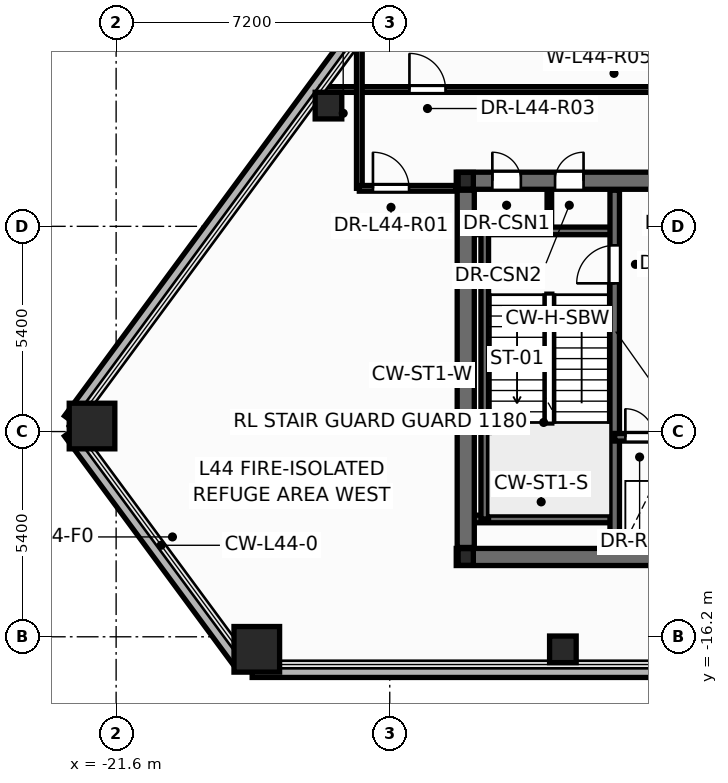
"""IFC4 building model, lengths in metres.
Left out: names, types, materials, properties, quantities, classifications, styles, units other than length and angle.
Written with IfcOpenShell. Run it as: python <this file> out.ifc"""

import sys

from ifc_helpers import new_model, si_unit, direction, frame, frame_2d, origin, origin_2d, place, context, subcontext, project, spatial, rectangle, hollow_rectangle, hollow_circle, i_section, extrude, element, fill, save


model = new_model("IFC4")
c1 = context("Model", 3, precision=1e-05, world=origin(), true_north=direction((0.0, 1.0)))
c2 = subcontext(c1, "Body", "Model", "MODEL_VIEW")
j1 = project(units=[si_unit("LENGTHUNIT", "METRE"), si_unit("PLANEANGLEUNIT", "RADIAN")], contexts=[c1])
p1 = place(None, origin())
s1 = spatial("IfcSite", under=j1, at=p1, CompositionType="ELEMENT")
p2 = place(p1, origin())
s2 = spatial("IfcBuilding", under=s1, at=p2, CompositionType="ELEMENT")
p3 = place(p2, frame((0.0, 0.0, 168.9)))
s3 = spatial("IfcBuildingStorey", under=s2, at=p3, CompositionType="ELEMENT", Elevation=168.9)
for number, where, z_axis, x_axis in (
    (1, (-22.234, -10.655, 0.0), (0.0, 0.0, 1.0), (1.0, 0.0, 0.0)),
    (2, (-17.898, -16.53, 0.0), (0.0, 0.0, 1.0), (1.0, 0.0, 0.0)),
):
    element("IfcColumn", number, at=place(p3, frame(where, z_axis=z_axis, x_axis=x_axis)), inside=s3, PredefinedType="COLUMN", context=c2, shape_type="SweptSolid", body=[
        extrude(hollow_rectangle(XDim=1.2, YDim=1.2, WallThickness=0.055, at=origin_2d()), origin(), (0.0, 0.0, 1.0), 4.8),
    ])
for number, where, z_axis, x_axis in (
    (3, (-9.844, -16.53, 0.0), (0.0, 0.0, 1.0), (1.0, 0.0, 0.0)),
    (4, (-16.012, -2.223, 0.0), (0.0, 0.0, 1.0), (1.0, 0.0, 0.0)),
):
    element("IfcColumn", number, at=place(p3, frame(where, z_axis=z_axis, x_axis=x_axis)), inside=s3, PredefinedType="COLUMN", context=c2, shape_type="SweptSolid", body=[
        extrude(hollow_circle(Radius=0.35, WallThickness=0.03, at=origin_2d()), origin(), (0.0, 0.0, 1.0), 4.8),
    ])
for number, where, z_axis, x_axis in (
    (5, (-12.4, -14.1, 0.0), (0.0, 0.0, 1.0), (1.0, 0.0, 0.0)),
    (6, (-12.4, -4.2, 0.0), (0.0, 0.0, 1.0), (1.0, 0.0, 0.0)),
):
    element("IfcColumn", number, at=place(p3, frame(where, z_axis=z_axis, x_axis=x_axis)), inside=s3, PredefinedType="COLUMN", context=c2, shape_type="SweptSolid", body=[
        extrude(i_section(OverallWidth=0.4, OverallDepth=0.44, WebThickness=0.028, FlangeThickness=0.04, at=origin_2d()), origin(), (0.0, 0.0, 1.0), 4.8),
    ])
p4 = place(p3, frame((-22.812, -10.814, -0.2), z_axis=(0.0, 0.0, 1.0), x_axis=(0.593789738392, -0.804620249919, 0.0)))
e7 = element("IfcWall", 7, at=p4, inside=s3, PredefinedType="PARAPET", context=c2, shape_type="SweptSolid", body=[
    extrude(rectangle(XDim=7.639, YDim=0.36, at=frame_2d((3.82, 0.0))), origin(), (0.0, 0.0, 1.0), 0.38),
])
p5 = place(p3, frame((-18.02, -17.09, -0.2), z_axis=(0.0, 0.0, 1.0), x_axis=(1.0, 0.0, 0.0)))
e8 = element("IfcWall", 8, at=p5, inside=s3, PredefinedType="PARAPET", context=c2, shape_type="SweptSolid", body=[
    extrude(rectangle(XDim=36.041, YDim=0.36, at=frame_2d((18.02, 0.0))), origin(), (0.0, 0.0, 1.0), 0.38),
])
p6 = place(p3, frame((-4.835, 13.865, -0.2), z_axis=(0.0, 0.0, 1.0), x_axis=(-0.593788907914, -0.804620862791, 0.0)))
e9 = element("IfcWall", 9, at=p6, inside=s3, PredefinedType="PARAPET", context=c2, shape_type="SweptSolid", body=[
    extrude(rectangle(XDim=30.276, YDim=0.36, at=frame_2d((15.138, 0.0))), origin(), (0.0, 0.0, 1.0), 0.38),
])
p7 = place(p3, frame((-10.2, -5.52, 0.0), z_axis=(0.0, 0.0, 1.0), x_axis=(0.0, 1.0, 0.0)))
e10 = element("IfcWall", 10, at=p7, inside=s3, PredefinedType="PARTITIONING", context=c2, shape_type="SweptSolid", body=[
    extrude(rectangle(XDim=1.12, YDim=0.12, at=frame_2d((0.56, 0.0))), origin(), (0.0, 0.0, 1.0), 4.52),
])
p8 = place(p3, frame((-12.65, -14.1, 0.0), z_axis=(0.0, 0.0, 1.0), x_axis=(1.0, 0.0, 0.0)))
e11 = element("IfcWall", 11, at=p8, inside=s3, PredefinedType="SHEAR", context=c2, shape_type="SweptSolid", body=[
    extrude(rectangle(XDim=25.3, YDim=0.45, at=frame_2d((12.65, 0.0))), origin(), (0.0, 0.0, 1.0), 4.8),
])
p9 = place(p3, frame((-12.65, -4.2, 0.0), z_axis=(0.0, 0.0, 1.0), x_axis=(1.0, 0.0, 0.0)))
e12 = element("IfcWall", 12, at=p9, inside=s3, PredefinedType="SHEAR", context=c2, shape_type="SweptSolid", body=[
    extrude(rectangle(XDim=25.3, YDim=0.45, at=frame_2d((12.65, 0.0))), origin(), (0.0, 0.0, 1.0), 4.8),
])
p10 = place(p9, frame((0.95, 0.0, 0.0)))
e13 = element("IfcOpeningElement", 13, at=p10, cuts=e12, PredefinedType="OPENING", context=c2, shape_type="SweptSolid", body=[
    extrude(rectangle(XDim=0.756, YDim=2.054, at=frame_2d((0.375, 1.027))), frame((0.0, 0.235, 0.0), z_axis=(0.0, -1.0, 0.0), x_axis=(1.0, 0.0, 0.0)), (0.0, 0.0, 1.0), 0.47),
])
p11 = place(p9, frame((2.6, 0.0, 0.0)))
e14 = element("IfcOpeningElement", 14, at=p11, cuts=e12, PredefinedType="OPENING", context=c2, shape_type="SweptSolid", body=[
    extrude(rectangle(XDim=0.756, YDim=2.054, at=frame_2d((0.375, 1.027))), frame((0.0, 0.235, 0.0), z_axis=(0.0, -1.0, 0.0), x_axis=(1.0, 0.0, 0.0)), (0.0, 0.0, 1.0), 0.47),
])
p12 = place(p9, frame((21.85, 0.0, 0.0)))
e15 = element("IfcOpeningElement", 15, at=p12, cuts=e12, PredefinedType="OPENING", context=c2, shape_type="SweptSolid", body=[
    extrude(rectangle(XDim=0.756, YDim=2.054, at=frame_2d((0.375, 1.027))), frame((0.0, 0.235, 0.0), z_axis=(0.0, -1.0, 0.0), x_axis=(1.0, 0.0, 0.0)), (0.0, 0.0, 1.0), 0.47),
])
p13 = place(p9, frame((23.5, 0.0, 0.0)))
e16 = element("IfcOpeningElement", 16, at=p13, cuts=e12, PredefinedType="OPENING", context=c2, shape_type="SweptSolid", body=[
    extrude(rectangle(XDim=0.756, YDim=2.054, at=frame_2d((0.375, 1.027))), frame((0.0, 0.235, 0.0), z_axis=(0.0, -1.0, 0.0), x_axis=(1.0, 0.0, 0.0)), (0.0, 0.0, 1.0), 0.47),
])
p14 = place(p9, frame((5.85, 0.0, 0.0)))
e17 = element("IfcOpeningElement", 17, at=p14, cuts=e12, PredefinedType="OPENING", context=c2, shape_type="SweptSolid", body=[
    extrude(rectangle(XDim=1.006, YDim=2.104, at=frame_2d((0.5, 1.052))), frame((0.0, 0.235, 0.0), z_axis=(0.0, -1.0, 0.0), x_axis=(1.0, 0.0, 0.0)), (0.0, 0.0, 1.0), 0.47),
])
p15 = place(p9, frame((10.35, 0.0, 0.0)))
e18 = element("IfcOpeningElement", 18, at=p15, cuts=e12, PredefinedType="OPENING", context=c2, shape_type="SweptSolid", body=[
    extrude(rectangle(XDim=1.406, YDim=2.154, at=frame_2d((0.7, 1.077))), frame((0.0, 0.235, 0.0), z_axis=(0.0, -1.0, 0.0), x_axis=(1.0, 0.0, 0.0)), (0.0, 0.0, 1.0), 0.47),
])
p16 = place(p9, frame((18.45, 0.0, 0.0)))
e19 = element("IfcOpeningElement", 19, at=p16, cuts=e12, PredefinedType="OPENING", context=c2, shape_type="SweptSolid", body=[
    extrude(rectangle(XDim=1.006, YDim=2.104, at=frame_2d((0.5, 1.052))), frame((0.0, 0.235, 0.0), z_axis=(0.0, -1.0, 0.0), x_axis=(1.0, 0.0, 0.0)), (0.0, 0.0, 1.0), 0.47),
])
for number, where, z_axis, x_axis in (
    (20, (-12.35, -5.52, 0.0), (0.0, 0.0, 1.0), (1.0, 0.0, 0.0)),
    (21, (-12.35, -13.1, 0.0), (0.0, 0.0, 1.0), (1.0, 0.0, 0.0)),
):
    element("IfcWall", number, at=place(p3, frame(where, z_axis=z_axis, x_axis=x_axis)), inside=s3, PredefinedType="SOLIDWALL", context=c2, shape_type="SweptSolid", body=[
        extrude(rectangle(XDim=3.87, YDim=0.2, at=frame_2d((1.935, 0.0))), origin(), (0.0, 0.0, 1.0), 4.8),
    ])
p17 = place(p3, frame((-11.9, -13.1, 0.0), z_axis=(0.0, 0.0, 1.0), x_axis=(0.0, 1.0, 0.0)))
e22 = element("IfcWall", 22, at=p17, inside=s3, PredefinedType="SOLIDWALL", context=c2, shape_type="SweptSolid", body=[
    extrude(rectangle(XDim=7.58, YDim=0.2, at=frame_2d((3.79, 0.0))), origin(), (0.0, 0.0, 1.0), 4.8),
])
p18 = place(p3, frame((-8.48, -13.85, 0.0), z_axis=(0.0, 0.0, 1.0), x_axis=(0.0, 1.0, 0.0)))
e23 = element("IfcWall", 23, at=p18, inside=s3, PredefinedType="SHEAR", context=c2, shape_type="SweptSolid", body=[
    extrude(rectangle(XDim=9.4, YDim=0.25, at=frame_2d((4.7, 0.0))), origin(), (0.0, 0.0, 1.0), 4.8),
])
p19 = place(p18, frame((6.95, 0.0, 0.0)))
e24 = element("IfcOpeningElement", 24, at=p19, cuts=e23, PredefinedType="OPENING", context=c2, shape_type="SweptSolid", body=[
    extrude(rectangle(XDim=1.006, YDim=2.104, at=frame_2d((0.5, 1.052))), frame((0.0, 0.135, 0.0), z_axis=(0.0, -1.0, 0.0), x_axis=(1.0, 0.0, 0.0)), (0.0, 0.0, 1.0), 0.27),
])
p20 = place(p3, frame((-8.48, -10.95, 0.0), z_axis=(0.0, 0.0, 1.0), x_axis=(1.0, 0.0, 0.0)))
e25 = element("IfcWall", 25, at=p20, inside=s3, PredefinedType="SOLIDWALL", context=c2, shape_type="SweptSolid", body=[
    extrude(rectangle(XDim=3.36, YDim=0.2, at=frame_2d((1.68, 0.0))), origin(), (0.0, 0.0, 1.0), 4.8),
])
p21 = place(p20, frame((0.28, 0.0, 0.0)))
e26 = element("IfcOpeningElement", 26, at=p21, cuts=e25, PredefinedType="OPENING", context=c2, shape_type="SweptSolid", body=[
    extrude(rectangle(XDim=0.756, YDim=2.054, at=frame_2d((0.375, 1.027))), frame((0.0, 0.11, 0.0), z_axis=(0.0, -1.0, 0.0), x_axis=(1.0, 0.0, 0.0)), (0.0, 0.0, 1.0), 0.22),
])
p22 = place(p20, frame((1.85, 0.0, 0.0)))
e27 = element("IfcOpeningElement", 27, at=p22, cuts=e25, PredefinedType="OPENING", context=c2, shape_type="SweptSolid", body=[
    extrude(rectangle(XDim=1.106, YDim=2.104, at=frame_2d((0.55, 1.052))), frame((0.0, 0.11, 0.0), z_axis=(0.0, -1.0, 0.0), x_axis=(1.0, 0.0, 0.0)), (0.0, 0.0, 1.0), 0.22),
])
p23 = place(p3, frame((-12.4, -13.85, 0.0), z_axis=(0.0, 0.0, 1.0), x_axis=(0.0, 1.0, 0.0)))
e28 = element("IfcWall", 28, at=p23, inside=s3, PredefinedType="SHEAR", context=c2, shape_type="SweptSolid", body=[
    extrude(rectangle(XDim=9.4, YDim=0.45, at=frame_2d((4.7, 0.0))), origin(), (0.0, 0.0, 1.0), 4.8),
])
p24 = place(p3, frame((-16.197, -1.8, 0.0), z_axis=(0.0, 0.0, 1.0), x_axis=(1.0, 0.0, 0.0)))
e29 = element("IfcWall", 29, at=p24, inside=s3, PredefinedType="PARTITIONING", context=c2, shape_type="SweptSolid", body=[
    extrude(rectangle(XDim=9.057, YDim=0.15, at=frame_2d((4.529, 0.0))), origin(), (0.0, 0.0, 1.0), 2.485),
])
p25 = place(p24, frame((2.315, 0.0, 0.0)))
e30 = element("IfcOpeningElement", 30, at=p25, cuts=e29, PredefinedType="OPENING", context=c2, shape_type="SweptSolid", body=[
    extrude(rectangle(XDim=0.956, YDim=2.104, at=frame_2d((0.475, 1.052))), frame((0.0, 0.085, 0.0), z_axis=(0.0, -1.0, 0.0), x_axis=(1.0, 0.0, 0.0)), (0.0, 0.0, 1.0), 0.17),
])
p26 = place(p3, frame((-15.2, -4.4, 0.0), z_axis=(0.0, 0.0, 1.0), x_axis=(0.0, 1.0, 0.0)))
e31 = element("IfcWall", 31, at=p26, inside=s3, PredefinedType="PARTITIONING", context=c2, shape_type="SweptSolid", body=[
    extrude(rectangle(XDim=3.951, YDim=0.15, at=frame_2d((1.975, 0.0))), origin(), (0.0, 0.0, 1.0), 2.485),
])
p27 = place(p3, frame((-15.2, -4.4, 0.0), z_axis=(0.0, 0.0, 1.0), x_axis=(1.0, 0.0, 0.0)))
e32 = element("IfcWall", 32, at=p27, inside=s3, PredefinedType="PARTITIONING", context=c2, shape_type="SweptSolid", body=[
    extrude(rectangle(XDim=2.548, YDim=0.15, at=frame_2d((1.274, 0.0))), origin(), (0.0, 0.0, 1.0), 2.485),
])
p28 = place(p27, frame((0.358, 0.0, 0.0)))
e33 = element("IfcOpeningElement", 33, at=p28, cuts=e32, PredefinedType="OPENING", context=c2, shape_type="SweptSolid", body=[
    extrude(rectangle(XDim=0.956, YDim=2.104, at=frame_2d((0.475, 1.052))), frame((0.0, 0.085, 0.0), z_axis=(0.0, -1.0, 0.0), x_axis=(1.0, 0.0, 0.0)), (0.0, 0.0, 1.0), 0.17),
])
p29 = place(p19, origin())
e34 = element("IfcDoor", 34, at=p29, inside=s3, OperationType="SINGLE_SWING_LEFT", PredefinedType="DOOR", context=c2, shape_type="SweptSolid", body=[
    extrude(rectangle(XDim=1.0, YDim=2.1, at=frame_2d((0.5, 1.05))), frame((0.0, 0.025, 0.0), z_axis=(0.0, -1.0, 0.0), x_axis=(1.0, 0.0, 0.0)), (0.0, 0.0, 1.0), 0.05),
])
fill(e24, e34)
p30 = place(p21, origin())
e35 = element("IfcDoor", 35, at=p30, inside=s3, OperationType="SINGLE_SWING_LEFT", PredefinedType="DOOR", context=c2, shape_type="SweptSolid", body=[
    extrude(rectangle(XDim=0.75, YDim=2.05, at=frame_2d((0.375, 1.025))), frame((0.0, 0.025, 0.0), z_axis=(0.0, -1.0, 0.0), x_axis=(1.0, 0.0, 0.0)), (0.0, 0.0, 1.0), 0.05),
])
fill(e26, e35)
p31 = place(p10, origin())
e36 = element("IfcDoor", 36, at=p31, inside=s3, OperationType="SINGLE_SWING_LEFT", PredefinedType="DOOR", context=c2, shape_type="SweptSolid", body=[
    extrude(rectangle(XDim=0.75, YDim=2.05, at=frame_2d((0.375, 1.025))), frame((0.0, 0.025, 0.0), z_axis=(0.0, -1.0, 0.0), x_axis=(1.0, 0.0, 0.0)), (0.0, 0.0, 1.0), 0.05),
])
fill(e13, e36)
p32 = place(p11, origin())
e37 = element("IfcDoor", 37, at=p32, inside=s3, OperationType="SINGLE_SWING_RIGHT", PredefinedType="DOOR", context=c2, shape_type="SweptSolid", body=[
    extrude(rectangle(XDim=0.75, YDim=2.05, at=frame_2d((0.375, 1.025))), frame((0.0, 0.025, 0.0), z_axis=(0.0, -1.0, 0.0), x_axis=(1.0, 0.0, 0.0)), (0.0, 0.0, 1.0), 0.05),
])
fill(e14, e37)
p33 = place(p28, origin())
e38 = element("IfcDoor", 38, at=p33, inside=s3, OperationType="SINGLE_SWING_LEFT", PredefinedType="DOOR", context=c2, shape_type="SweptSolid", body=[
    extrude(rectangle(XDim=0.95, YDim=2.1, at=frame_2d((0.475, 1.05))), frame((0.0, 0.025, 0.0), z_axis=(0.0, -1.0, 0.0), x_axis=(1.0, 0.0, 0.0)), (0.0, 0.0, 1.0), 0.05),
])
fill(e33, e38)
p34 = place(p25, origin())
e39 = element("IfcDoor", 39, at=p34, inside=s3, OperationType="SINGLE_SWING_LEFT", PredefinedType="DOOR", context=c2, shape_type="SweptSolid", body=[
    extrude(rectangle(XDim=0.95, YDim=2.1, at=frame_2d((0.475, 1.05))), frame((0.0, 0.025, 0.0), z_axis=(0.0, -1.0, 0.0), x_axis=(1.0, 0.0, 0.0)), (0.0, 0.0, 1.0), 0.05),
])
fill(e30, e39)
save(model, sys.argv[1])
